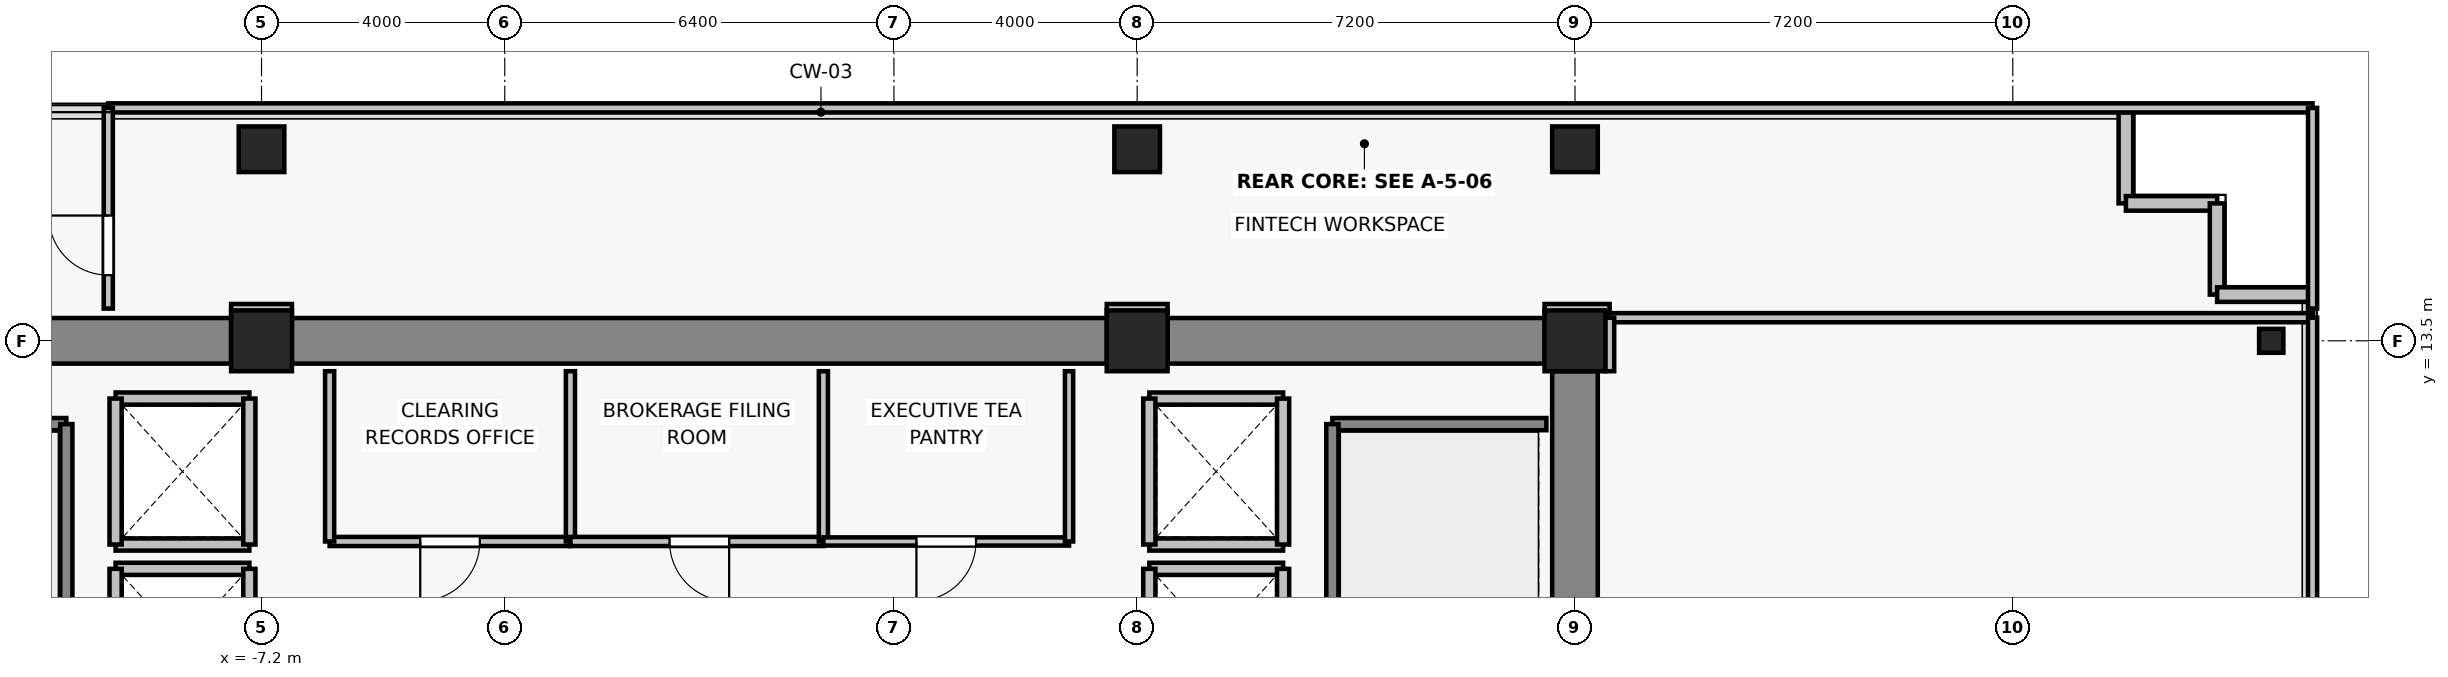
"""IFC4 building model, lengths in metres.
Left out: names, types, materials, properties, quantities, classifications, styles, units other than length and angle.
Written with IfcOpenShell. Run it as: python <this file> out.ifc"""

import sys

from ifc_helpers import new_model, si_unit, direction, frame, frame_2d, origin, origin_2d, place, context, subcontext, project, spatial, rectangle, i_section, extrude, source, transform, mapped, element, fill, save


model = new_model("IFC4")
c1 = context("Model", 3, precision=1e-05, world=origin(), true_north=direction((0.0, 1.0)))
c2 = subcontext(c1, "Body", "Model", "MODEL_VIEW")
j1 = project(units=[si_unit("LENGTHUNIT", "METRE"), si_unit("PLANEANGLEUNIT", "RADIAN")], contexts=[c1])
p1 = place(None, origin())
s1 = spatial("IfcSite", under=j1, at=p1, CompositionType="ELEMENT")
p2 = place(p1, origin())
s2 = spatial("IfcBuilding", under=s1, at=p2, CompositionType="ELEMENT")
p3 = place(p2, frame((0.0, 0.0, 172.6)))
s3 = spatial("IfcBuildingStorey", under=s2, at=p3, CompositionType="ELEMENT", Elevation=172.6)
for number, where, z_axis, x_axis in (
    (1, (-7.2, 13.5, 0.0), (0.0, 0.0, 1.0), (1.0, 0.0, 0.0)),
    (2, (7.2, 13.5, 0.0), (0.0, 0.0, 1.0), (1.0, 0.0, 0.0)),
    (3, (14.4, 13.5, 0.0), (0.0, 0.0, 1.0), (1.0, 0.0, 0.0)),
):
    element("IfcColumn", number, at=place(p3, frame(where, z_axis=z_axis, x_axis=x_axis)), inside=s3, PredefinedType="COLUMN", context=c2, shape_type="SweptSolid", body=[
        extrude(rectangle(XDim=1.0, YDim=1.0, at=origin_2d()), origin(), (0.0, 0.0, 1.0), 3.3),
    ])
for number, where, z_axis, x_axis in (
    (4, (-7.2, 16.65, 0.0), (0.0, 0.0, 1.0), (1.0, 0.0, 0.0)),
    (5, (7.2, 16.65, 0.0), (0.0, 0.0, 1.0), (1.0, 0.0, 0.0)),
    (6, (14.4, 16.65, 0.0), (0.0, 0.0, 1.0), (1.0, 0.0, 0.0)),
):
    element("IfcColumn", number, at=place(p3, frame(where, z_axis=z_axis, x_axis=x_axis)), inside=s3, PredefinedType="COLUMN", context=c2, shape_type="SweptSolid", body=[
        extrude(rectangle(XDim=0.75, YDim=0.75, at=origin_2d()), origin(), (0.0, 0.0, 1.0), 3.3),
    ])
p4 = place(p3, frame((25.85, 13.5, 0.0), z_axis=(0.0, 0.0, 1.0), x_axis=(1.0, 0.0, 0.0)))
e7 = element("IfcColumn", 7, at=p4, inside=s3, PredefinedType="COLUMN", context=c2, shape_type="SweptSolid", body=[
    extrude(i_section(OverallWidth=0.399, OverallDepth=0.394, WebThickness=0.023, FlangeThickness=0.037, FilletRadius=0.015, at=origin_2d()), origin(), (0.0, 0.0, 1.0), 3.3),
])
p5 = place(p3, frame((-13.9, 13.5, 0.0), z_axis=(0.0, 0.0, 1.0), x_axis=(1.0, 0.0, 0.0)))
e8 = element("IfcWall", 8, at=p5, inside=s3, PredefinedType="SHEAR", context=c2, shape_type="SweptSolid", body=[
    extrude(rectangle(XDim=6.2, YDim=0.75, at=frame_2d((3.1, 0.0))), origin(), (0.0, 0.0, 1.0), 3.075),
])
p6 = place(p3, frame((-6.7, 13.5, 0.0), z_axis=(0.0, 0.0, 1.0), x_axis=(1.0, 0.0, 0.0)))
e9 = element("IfcWall", 9, at=p6, inside=s3, PredefinedType="SHEAR", context=c2, shape_type="SweptSolid", body=[
    extrude(rectangle(XDim=13.4, YDim=0.75, at=frame_2d((6.7, 0.0))), origin(), (0.0, 0.0, 1.0), 3.075),
])
p7 = place(p3, frame((7.7, 13.5, 0.0), z_axis=(0.0, 0.0, 1.0), x_axis=(1.0, 0.0, 0.0)))
e10 = element("IfcWall", 10, at=p7, inside=s3, PredefinedType="SHEAR", context=c2, shape_type="SweptSolid", body=[
    extrude(rectangle(XDim=6.2, YDim=0.75, at=frame_2d((3.1, 0.0))), origin(), (0.0, 0.0, 1.0), 3.075),
])
p8 = place(p3, frame((14.4, 7.1, 0.0), z_axis=(0.0, 0.0, 1.0), x_axis=(0.0, 1.0, 0.0)))
e11 = element("IfcWall", 11, at=p8, inside=s3, PredefinedType="SHEAR", context=c2, shape_type="SweptSolid", body=[
    extrude(rectangle(XDim=5.9, YDim=0.75, at=frame_2d((2.95, 0.0))), origin(), (0.0, 0.0, 1.0), 3.075),
])
for number, where, z_axis, x_axis in (
    (12, (23.46, 15.76, 0.0), (0.0, 0.0, 1.0), (0.0, 1.0, 0.0)),
    (13, (24.96, 15.76, 0.0), (0.0, 0.0, 1.0), (-1.0, 0.0, 0.0)),
    (14, (24.96, 14.26, 0.0), (0.0, 0.0, 1.0), (0.0, 1.0, 0.0)),
    (15, (26.46, 14.26, 0.0), (0.0, 0.0, 1.0), (-1.0, 0.0, 0.0)),
):
    element("IfcWall", number, at=place(p3, frame(where, z_axis=z_axis, x_axis=x_axis)), inside=s3, PredefinedType="SOLIDWALL", context=c2, shape_type="SweptSolid", body=[
        extrude(rectangle(XDim=1.5, YDim=0.24, at=frame_2d((0.75, 0.0))), origin(), (0.0, 0.0, 1.0), 3.075),
    ])
p9 = place(p3, frame((-9.6, 9.75, 0.0), z_axis=(0.0, 0.0, 1.0), x_axis=(1.0, 0.0, 0.0)))
e16 = element("IfcWall", 16, at=p9, inside=s3, PredefinedType="SOLIDWALL", context=c2, shape_type="SweptSolid", body=[
    extrude(rectangle(XDim=2.2, YDim=0.2, at=frame_2d((1.1, 0.0))), origin(), (0.0, 0.0, 1.0), 2.565),
])
p10 = place(p3, frame((-9.6, 7.35, 0.0), z_axis=(0.0, 0.0, 1.0), x_axis=(0.0, 1.0, 0.0)))
e17 = element("IfcWall", 17, at=p10, inside=s3, PredefinedType="SOLIDWALL", context=c2, shape_type="SweptSolid", body=[
    extrude(rectangle(XDim=2.4, YDim=0.2, at=frame_2d((1.2, 0.0))), origin(), (0.0, 0.0, 1.0), 3.075),
])
p11 = place(p3, frame((-7.4, 9.75, 0.0), z_axis=(0.0, 0.0, 1.0), x_axis=(0.0, -1.0, 0.0)))
e18 = element("IfcWall", 18, at=p11, inside=s3, PredefinedType="SOLIDWALL", context=c2, shape_type="SweptSolid", body=[
    extrude(rectangle(XDim=2.4, YDim=0.2, at=frame_2d((1.2, 0.0))), origin(), (0.0, 0.0, 1.0), 2.565),
])
for number, where, z_axis, x_axis in (
    (19, (-7.4, 10.15, 0.0), (0.0, 0.0, 1.0), (-1.0, 0.0, 0.0)),
    (20, (-9.6, 12.55, 0.0), (0.0, 0.0, 1.0), (1.0, 0.0, 0.0)),
):
    element("IfcWall", number, at=place(p3, frame(where, z_axis=z_axis, x_axis=x_axis)), inside=s3, PredefinedType="SOLIDWALL", context=c2, shape_type="SweptSolid", body=[
        extrude(rectangle(XDim=2.2, YDim=0.2, at=frame_2d((1.1, 0.0))), origin(), (0.0, 0.0, 1.0), 2.565),
    ])
p12 = place(p3, frame((-9.6, 10.15, 0.0), z_axis=(0.0, 0.0, 1.0), x_axis=(0.0, 1.0, 0.0)))
e21 = element("IfcWall", 21, at=p12, inside=s3, PredefinedType="SOLIDWALL", context=c2, shape_type="SweptSolid", body=[
    extrude(rectangle(XDim=2.4, YDim=0.2, at=frame_2d((1.2, 0.0))), origin(), (0.0, 0.0, 1.0), 3.075),
])
p13 = place(p3, frame((-7.4, 12.55, 0.0), z_axis=(0.0, 0.0, 1.0), x_axis=(0.0, -1.0, 0.0)))
e22 = element("IfcWall", 22, at=p13, inside=s3, PredefinedType="SOLIDWALL", context=c2, shape_type="SweptSolid", body=[
    extrude(rectangle(XDim=2.4, YDim=0.2, at=frame_2d((1.2, 0.0))), origin(), (0.0, 0.0, 1.0), 2.565),
])
p14 = place(p3, frame((7.4, 9.75, 0.0), z_axis=(0.0, 0.0, 1.0), x_axis=(1.0, 0.0, 0.0)))
e23 = element("IfcWall", 23, at=p14, inside=s3, PredefinedType="SOLIDWALL", context=c2, shape_type="SweptSolid", body=[
    extrude(rectangle(XDim=2.2, YDim=0.2, at=frame_2d((1.1, 0.0))), origin(), (0.0, 0.0, 1.0), 2.565),
])
p15 = place(p3, frame((7.4, 7.35, 0.0), z_axis=(0.0, 0.0, 1.0), x_axis=(0.0, 1.0, 0.0)))
e24 = element("IfcWall", 24, at=p15, inside=s3, PredefinedType="SOLIDWALL", context=c2, shape_type="SweptSolid", body=[
    extrude(rectangle(XDim=2.4, YDim=0.2, at=frame_2d((1.2, 0.0))), origin(), (0.0, 0.0, 1.0), 2.565),
])
p16 = place(p3, frame((9.6, 9.75, 0.0), z_axis=(0.0, 0.0, 1.0), x_axis=(0.0, -1.0, 0.0)))
e25 = element("IfcWall", 25, at=p16, inside=s3, PredefinedType="SOLIDWALL", context=c2, shape_type="SweptSolid", body=[
    extrude(rectangle(XDim=2.4, YDim=0.2, at=frame_2d((1.2, 0.0))), origin(), (0.0, 0.0, 1.0), 3.075),
])
for number, where, z_axis, x_axis in (
    (26, (9.6, 10.15, 0.0), (0.0, 0.0, 1.0), (-1.0, 0.0, 0.0)),
    (27, (7.4, 12.55, 0.0), (0.0, 0.0, 1.0), (1.0, 0.0, 0.0)),
):
    element("IfcWall", number, at=place(p3, frame(where, z_axis=z_axis, x_axis=x_axis)), inside=s3, PredefinedType="SOLIDWALL", context=c2, shape_type="SweptSolid", body=[
        extrude(rectangle(XDim=2.2, YDim=0.2, at=frame_2d((1.1, 0.0))), origin(), (0.0, 0.0, 1.0), 2.565),
    ])
p17 = place(p3, frame((7.4, 10.15, 0.0), z_axis=(0.0, 0.0, 1.0), x_axis=(0.0, 1.0, 0.0)))
e28 = element("IfcWall", 28, at=p17, inside=s3, PredefinedType="SOLIDWALL", context=c2, shape_type="SweptSolid", body=[
    extrude(rectangle(XDim=2.4, YDim=0.2, at=frame_2d((1.2, 0.0))), origin(), (0.0, 0.0, 1.0), 2.565),
])
p18 = place(p3, frame((9.6, 12.55, 0.0), z_axis=(0.0, 0.0, 1.0), x_axis=(0.0, -1.0, 0.0)))
e29 = element("IfcWall", 29, at=p18, inside=s3, PredefinedType="SOLIDWALL", context=c2, shape_type="SweptSolid", body=[
    extrude(rectangle(XDim=2.4, YDim=0.2, at=frame_2d((1.2, 0.0))), origin(), (0.0, 0.0, 1.0), 3.075),
])
p19 = place(p3, frame((-13.93, 12.13, 0.0), z_axis=(0.0, 0.0, 1.0), x_axis=(1.0, 0.0, 0.0)))
e30 = element("IfcWall", 30, at=p19, inside=s3, PredefinedType="SOLIDWALL", context=c2, shape_type="SweptSolid", body=[
    extrude(rectangle(XDim=3.52, YDim=0.2, at=frame_2d((1.76, 0.0))), origin(), (0.0, 0.0, 1.0), 3.075),
])
p20 = place(p3, frame((-10.41, 12.13, 0.0), z_axis=(0.0, 0.0, 1.0), x_axis=(0.0, -1.0, 0.0)))
e31 = element("IfcWall", 31, at=p20, inside=s3, PredefinedType="SOLIDWALL", context=c2, shape_type="SweptSolid", body=[
    extrude(rectangle(XDim=8.84, YDim=0.2, at=frame_2d((4.42, 0.0))), origin(), (0.0, 0.0, 1.0), 3.075),
])
p21 = place(p3, frame((10.41, 12.13, 0.0), z_axis=(0.0, 0.0, 1.0), x_axis=(1.0, 0.0, 0.0)))
e32 = element("IfcWall", 32, at=p21, inside=s3, PredefinedType="SOLIDWALL", context=c2, shape_type="SweptSolid", body=[
    extrude(rectangle(XDim=3.52, YDim=0.2, at=frame_2d((1.76, 0.0))), origin(), (0.0, 0.0, 1.0), 3.075),
])
p22 = place(p3, frame((10.41, 3.29, 0.0), z_axis=(0.0, 0.0, 1.0), x_axis=(0.0, 1.0, 0.0)))
e33 = element("IfcWall", 33, at=p22, inside=s3, PredefinedType="SOLIDWALL", context=c2, shape_type="SweptSolid", body=[
    extrude(rectangle(XDim=8.84, YDim=0.2, at=frame_2d((4.42, 0.0))), origin(), (0.0, 0.0, 1.0), 3.075),
])
p23 = place(p3, frame((-2.12, 10.2, 0.0), z_axis=(0.0, 0.0, 1.0), x_axis=(-1.0, 0.0, 0.0)))
e34 = element("IfcWall", 34, at=p23, inside=s3, PredefinedType="PARTITIONING", context=c2, shape_type="SweptSolid", body=[
    extrude(rectangle(XDim=3.96, YDim=0.15, at=frame_2d((1.98, 0.0))), origin(), (0.0, 0.0, 1.0), 3.075),
])
p24 = place(p23, frame((1.49, 0.0, 0.0)))
e35 = element("IfcOpeningElement", 35, at=p24, cuts=e34, PredefinedType="OPENING", context=c2, shape_type="SweptSolid", body=[
    extrude(rectangle(XDim=0.98, YDim=2.15, at=frame_2d((0.49, 1.075))), frame((0.0, 0.085, 0.0), z_axis=(0.0, -1.0, 0.0), x_axis=(1.0, 0.0, 0.0)), (0.0, 0.0, 1.0), 0.17),
])
for number, where, z_axis, x_axis in (
    (36, (-6.08, 10.2, 0.0), (0.0, 0.0, 1.0), (0.0, 1.0, 0.0)),
    (37, (-2.12, 13.0, 0.0), (0.0, 0.0, 1.0), (0.0, -1.0, 0.0)),
):
    element("IfcWall", number, at=place(p3, frame(where, z_axis=z_axis, x_axis=x_axis)), inside=s3, PredefinedType="PARTITIONING", context=c2, shape_type="SweptSolid", body=[
        extrude(rectangle(XDim=2.8, YDim=0.15, at=frame_2d((1.4, 0.0))), origin(), (0.0, 0.0, 1.0), 3.075),
    ])
p25 = place(p3, frame((2.04, 10.2, 0.0), z_axis=(0.0, 0.0, 1.0), x_axis=(-1.0, 0.0, 0.0)))
e38 = element("IfcWall", 38, at=p25, inside=s3, PredefinedType="PARTITIONING", context=c2, shape_type="SweptSolid", body=[
    extrude(rectangle(XDim=4.16, YDim=0.15, at=frame_2d((2.08, 0.0))), origin(), (0.0, 0.0, 1.0), 3.075),
])
p26 = place(p25, frame((1.55, 0.0, 0.0)))
e39 = element("IfcOpeningElement", 39, at=p26, cuts=e38, PredefinedType="OPENING", context=c2, shape_type="SweptSolid", body=[
    extrude(rectangle(XDim=0.98, YDim=2.15, at=frame_2d((0.49, 1.075))), frame((0.0, 0.085, 0.0), z_axis=(0.0, -1.0, 0.0), x_axis=(1.0, 0.0, 0.0)), (0.0, 0.0, 1.0), 0.17),
])
p27 = place(p3, frame((2.04, 13.0, 0.0), z_axis=(0.0, 0.0, 1.0), x_axis=(0.0, -1.0, 0.0)))
e40 = element("IfcWall", 40, at=p27, inside=s3, PredefinedType="PARTITIONING", context=c2, shape_type="SweptSolid", body=[
    extrude(rectangle(XDim=2.8, YDim=0.15, at=frame_2d((1.4, 0.0))), origin(), (0.0, 0.0, 1.0), 3.075),
])
p28 = place(p3, frame((6.08, 10.2, 0.0), z_axis=(0.0, 0.0, 1.0), x_axis=(-1.0, 0.0, 0.0)))
e41 = element("IfcWall", 41, at=p28, inside=s3, PredefinedType="PARTITIONING", context=c2, shape_type="SweptSolid", body=[
    extrude(rectangle(XDim=4.04, YDim=0.135, at=frame_2d((2.02, 0.0))), origin(), (0.0, 0.0, 1.0), 3.075),
])
p29 = place(p28, frame((1.53, 0.0, 0.0)))
e42 = element("IfcOpeningElement", 42, at=p29, cuts=e41, PredefinedType="OPENING", context=c2, shape_type="SweptSolid", body=[
    extrude(rectangle(XDim=0.98, YDim=2.15, at=frame_2d((0.49, 1.075))), frame((0.0, 0.077, 0.0), z_axis=(0.0, -1.0, 0.0), x_axis=(1.0, 0.0, 0.0)), (0.0, 0.0, 1.0), 0.155),
])
p30 = place(p3, frame((6.08, 13.0, 0.0), z_axis=(0.0, 0.0, 1.0), x_axis=(0.0, -1.0, 0.0)))
e43 = element("IfcWall", 43, at=p30, inside=s3, PredefinedType="PARTITIONING", context=c2, shape_type="SweptSolid", body=[
    extrude(rectangle(XDim=2.8, YDim=0.135, at=frame_2d((1.4, 0.0))), origin(), (0.0, 0.0, 1.0), 3.075),
])
p31 = place(p3, frame((14.97, 13.88, 0.0), z_axis=(0.0, 0.0, 1.0), x_axis=(1.0, 0.0, 0.0)))
e44 = element("IfcWall", 44, at=p31, inside=s3, PredefinedType="PARTITIONING", context=c2, shape_type="SweptSolid", body=[
    extrude(rectangle(XDim=11.56, YDim=0.15, at=frame_2d((5.78, 0.0))), origin(), (0.0, 0.0, 1.0), 3.075),
])
p32 = place(p3, frame((14.97, 13.0, 0.0), z_axis=(0.0, 0.0, 1.0), x_axis=(0.0, 1.0, 0.0)))
e45 = element("IfcWall", 45, at=p32, inside=s3, PredefinedType="PARTITIONING", context=c2, shape_type="SweptSolid", body=[
    extrude(rectangle(XDim=0.88, YDim=0.15, at=frame_2d((0.44, 0.0))), origin(), (0.0, 0.0, 1.0), 2.565),
])
p33 = place(p3, frame((26.53, 13.88, 0.0), z_axis=(0.0, 0.0, 1.0), x_axis=(0.0, -1.0, 0.0)))
e46 = element("IfcWall", 46, at=p33, inside=s3, PredefinedType="PARTITIONING", context=c2, shape_type="SweptSolid", body=[
    extrude(rectangle(XDim=15.65, YDim=0.15, at=frame_2d((7.825, 0.0))), origin(), (0.0, 0.0, 1.0), 3.075),
])
for number, where, z_axis, x_axis in (
    (47, (-6.7, 14.03, 0.0), (0.0, 0.0, 1.0), (-1.0, 0.0, 0.0)),
    (48, (7.7, 14.03, 0.0), (0.0, 0.0, 1.0), (-1.0, 0.0, 0.0)),
):
    element("IfcWall", number, at=place(p3, frame(where, z_axis=z_axis, x_axis=x_axis)), inside=s3, PredefinedType="PARTITIONING", context=c2, shape_type="SweptSolid", body=[
        extrude(rectangle(XDim=1.0, YDim=0.15, at=frame_2d((0.5, 0.0))), origin(), (0.0, 0.0, 1.0), 2.565),
    ])
p34 = place(p3, frame((14.97, 14.03, 0.0), z_axis=(0.0, 0.0, 1.0), x_axis=(-1.0, 0.0, 0.0)))
e49 = element("IfcWall", 49, at=p34, inside=s3, PredefinedType="PARTITIONING", context=c2, shape_type="SweptSolid", body=[
    extrude(rectangle(XDim=1.07, YDim=0.15, at=frame_2d((0.535, 0.0))), origin(), (0.0, 0.0, 1.0), 2.565),
])
p35 = place(p3, frame((-9.72, 17.33, 0.0), z_axis=(0.0, 0.0, 1.0), x_axis=(1.0, 0.0, 0.0)))
e50 = element("IfcWall", 50, at=p35, inside=s3, PredefinedType="PARTITIONING", context=c2, shape_type="SweptSolid", body=[
    extrude(rectangle(XDim=36.25, YDim=0.15, at=frame_2d((18.125, 0.0))), origin(), (0.0, 0.0, 1.0), 3.075),
])
p36 = place(p3, frame((-9.72, 14.03, 0.0), z_axis=(0.0, 0.0, 1.0), x_axis=(0.0, 1.0, 0.0)))
e51 = element("IfcWall", 51, at=p36, inside=s3, PredefinedType="PARTITIONING", context=c2, shape_type="SweptSolid", body=[
    extrude(rectangle(XDim=3.3, YDim=0.15, at=frame_2d((1.65, 0.0))), origin(), (0.0, 0.0, 1.0), 2.565),
])
p37 = place(p36, frame((0.55, 0.0, 0.0)))
e52 = element("IfcOpeningElement", 52, at=p37, cuts=e51, PredefinedType="OPENING", context=c2, shape_type="SweptSolid", body=[
    extrude(rectangle(XDim=0.98, YDim=2.15, at=frame_2d((0.49, 1.075))), frame((0.0, 0.085, 0.0), z_axis=(0.0, -1.0, 0.0), x_axis=(1.0, 0.0, 0.0)), (0.0, 0.0, 1.0), 0.17),
])
p38 = place(p3, frame((26.53, 17.33, 0.0), z_axis=(0.0, 0.0, 1.0), x_axis=(0.0, -1.0, 0.0)))
e53 = element("IfcWall", 53, at=p38, inside=s3, PredefinedType="PARTITIONING", context=c2, shape_type="SweptSolid", body=[
    extrude(rectangle(XDim=3.3, YDim=0.15, at=frame_2d((1.65, 0.0))), origin(), (0.0, 0.0, 1.0), 3.075),
])
m1 = source(origin(), c2, "Body", "SweptSolid", [
    extrude(rectangle(XDim=0.98, YDim=2.15, at=frame_2d((0.49, 1.075))), frame((0.0, 0.025, 0.0), z_axis=(0.0, -1.0, 0.0), x_axis=(1.0, 0.0, 0.0)), (0.0, 0.0, 1.0), 0.05),
])
p39 = place(p24, origin())
e54 = element("IfcDoor", 54, at=p39, inside=s3, OperationType="SINGLE_SWING_RIGHT", PredefinedType="DOOR", context=c2, shape_type="MappedRepresentation", body=[
    mapped(m1, transform((0.0, 0.0, 0.0), x_axis=(1.0, 0.0, 0.0), y_axis=(0.0, 1.0, 0.0), z_axis=(0.0, 0.0, 1.0), scale=1.0)),
])
fill(e35, e54)
p40 = place(p26, origin())
e55 = element("IfcDoor", 55, at=p40, inside=s3, OperationType="SINGLE_SWING_LEFT", PredefinedType="DOOR", context=c2, shape_type="MappedRepresentation", body=[
    mapped(m1, transform((0.0, 0.0, 0.0), x_axis=(1.0, 0.0, 0.0), y_axis=(0.0, 1.0, 0.0), z_axis=(0.0, 0.0, 1.0), scale=1.0)),
])
fill(e39, e55)
p41 = place(p29, origin())
e56 = element("IfcDoor", 56, at=p41, inside=s3, OperationType="SINGLE_SWING_RIGHT", PredefinedType="DOOR", context=c2, shape_type="MappedRepresentation", body=[
    mapped(m1, transform((0.0, 0.0, 0.0), x_axis=(1.0, 0.0, 0.0), y_axis=(0.0, 1.0, 0.0), z_axis=(0.0, 0.0, 1.0), scale=1.0)),
])
fill(e42, e56)
p42 = place(p37, origin())
e57 = element("IfcDoor", 57, at=p42, inside=s3, OperationType="SINGLE_SWING_RIGHT", PredefinedType="DOOR", context=c2, shape_type="MappedRepresentation", body=[
    mapped(m1, transform((0.0, 0.0, 0.0), x_axis=(1.0, 0.0, 0.0), y_axis=(0.0, 1.0, 0.0), z_axis=(0.0, 0.0, 1.0), scale=1.0)),
])
fill(e52, e57)
save(model, sys.argv[1])
